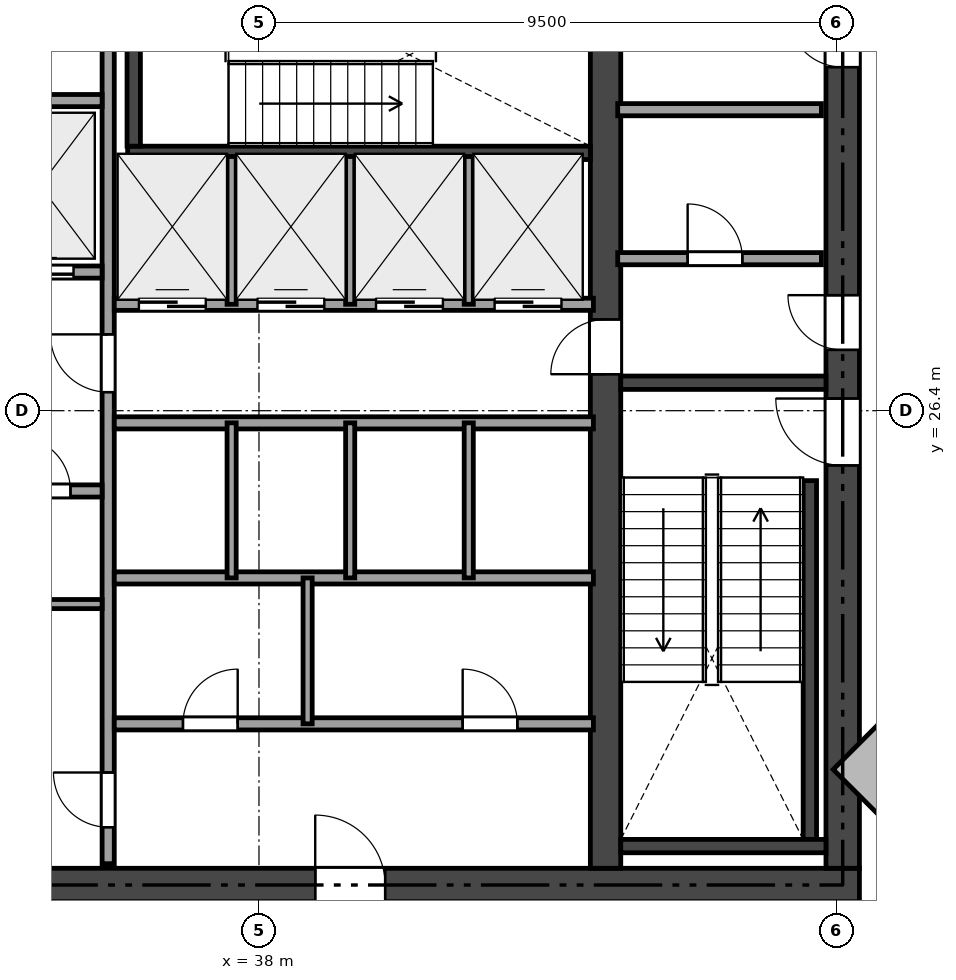
"""IFC4 building model, lengths in metres.
Left out: names, types, materials, properties, quantities, classifications, styles, units other than length and angle.
Written with IfcOpenShell. Run it as: python <this file> out.ifc"""

import sys

from ifc_helpers import new_model, si_unit, direction, frame, frame_2d, origin, place, context, subcontext, project, spatial, rectangle, extrude, element, fill, save


model = new_model("IFC4")
c1 = context("Model", 3, precision=1e-05, world=origin(), true_north=direction((0.0, 1.0)))
c2 = subcontext(c1, "Body", "Model", "MODEL_VIEW")
j1 = project(units=[si_unit("LENGTHUNIT", "METRE"), si_unit("PLANEANGLEUNIT", "RADIAN")], contexts=[c1])
p1 = place(None, origin())
s1 = spatial("IfcSite", under=j1, at=p1, CompositionType="ELEMENT")
p2 = place(p1, origin())
s2 = spatial("IfcBuilding", under=s1, at=p2, CompositionType="ELEMENT")
p3 = place(p2, frame((0.0, 0.0, 223.8)))
s3 = spatial("IfcBuildingStorey", under=s2, at=p3, CompositionType="ELEMENT", Elevation=223.8)
p4 = place(p3, frame((26.525, 18.6, 0.0), z_axis=(0.0, 0.0, 1.0), x_axis=(1.0, 0.0, 0.0)))
e1 = element("IfcWall", 1, at=p4, inside=s3, PredefinedType="SHEAR", context=c2, shape_type="SweptSolid", body=[
    extrude(rectangle(XDim=21.35, YDim=0.55, at=frame_2d((10.675, 0.0))), origin(), (0.0, 0.0, 1.0), 4.14),
])
p5 = place(p4, frame((12.4, 0.0, 0.0)))
e2 = element("IfcOpeningElement", 2, at=p5, cuts=e1, PredefinedType="OPENING", context=c2, shape_type="SweptSolid", body=[
    extrude(rectangle(XDim=1.15, YDim=2.15, at=frame_2d((0.575, 1.075))), frame((0.0, 0.285, 0.0), z_axis=(0.0, -1.0, 0.0), x_axis=(1.0, 0.0, 0.0)), (0.0, 0.0, 1.0), 0.57),
])
p6 = place(p4, frame((5.225, 0.0, 0.0)))
e3 = element("IfcOpeningElement", 3, at=p6, cuts=e1, PredefinedType="OPENING", context=c2, shape_type="SweptSolid", body=[
    extrude(rectangle(XDim=0.9, YDim=2.1, at=frame_2d((0.45, 1.05))), frame((0.0, 0.285, 0.0), z_axis=(0.0, -1.0, 0.0), x_axis=(1.0, 0.0, 0.0)), (0.0, 0.0, 1.0), 0.57),
])
p7 = place(p3, frame((47.6, 18.875, 0.0), z_axis=(0.0, 0.0, 1.0), x_axis=(0.0, 1.0, 0.0)))
e4 = element("IfcWall", 4, at=p7, inside=s3, PredefinedType="SHEAR", context=c2, shape_type="SweptSolid", body=[
    extrude(rectangle(XDim=15.05, YDim=0.55, at=frame_2d((7.525, 0.0))), origin(), (0.0, 0.0, 1.0), 4.14),
])
p8 = place(p7, frame((6.625, 0.0, 0.0)))
e5 = element("IfcOpeningElement", 5, at=p8, cuts=e4, PredefinedType="OPENING", context=c2, shape_type="SweptSolid", body=[
    extrude(rectangle(XDim=1.1, YDim=2.15, at=frame_2d((0.55, 1.075))), frame((0.0, 0.285, 0.0), z_axis=(0.0, -1.0, 0.0), x_axis=(1.0, 0.0, 0.0)), (0.0, 0.0, 1.0), 0.57),
])
p9 = place(p7, frame((8.525, 0.0, 0.0)))
e6 = element("IfcOpeningElement", 6, at=p9, cuts=e4, PredefinedType="OPENING", context=c2, shape_type="SweptSolid", body=[
    extrude(rectangle(XDim=0.9, YDim=2.1, at=frame_2d((0.45, 1.05))), frame((0.0, 0.285, 0.0), z_axis=(0.0, -1.0, 0.0), x_axis=(1.0, 0.0, 0.0)), (0.0, 0.0, 1.0), 0.57),
])
p10 = place(p7, frame((13.175, 0.0, 0.0)))
e7 = element("IfcOpeningElement", 7, at=p10, cuts=e4, PredefinedType="OPENING", context=c2, shape_type="SweptSolid", body=[
    extrude(rectangle(XDim=0.9, YDim=2.1, at=frame_2d((0.45, 1.05))), frame((0.0, 0.285, 0.0), z_axis=(0.0, -1.0, 0.0), x_axis=(1.0, 0.0, 0.0)), (0.0, 0.0, 1.0), 0.57),
])
p11 = place(p3, frame((43.7, 18.875, 0.0), z_axis=(0.0, 0.0, 1.0), x_axis=(0.0, 1.0, 0.0)))
e8 = element("IfcWall", 8, at=p11, inside=s3, PredefinedType="SHEAR", context=c2, shape_type="SweptSolid", body=[
    extrude(rectangle(XDim=15.05, YDim=0.5, at=frame_2d((7.525, 0.0))), origin(), (0.0, 0.0, 1.0), 4.14),
])
p12 = place(p11, frame((8.125, 0.0, 0.0)))
e9 = element("IfcOpeningElement", 9, at=p12, cuts=e8, PredefinedType="OPENING", context=c2, shape_type="SweptSolid", body=[
    extrude(rectangle(XDim=0.9, YDim=2.1, at=frame_2d((0.45, 1.05))), frame((0.0, 0.26, 0.0), z_axis=(0.0, -1.0, 0.0), x_axis=(1.0, 0.0, 0.0)), (0.0, 0.0, 1.0), 0.52),
])
p13 = place(p3, frame((43.95, 26.86, 0.0), z_axis=(0.0, 0.0, 1.0), x_axis=(1.0, 0.0, 0.0)))
e10 = element("IfcWall", 10, at=p13, inside=s3, PredefinedType="SHEAR", context=c2, shape_type="SweptSolid", body=[
    extrude(rectangle(XDim=3.375, YDim=0.22, at=frame_2d((1.688, 0.0))), origin(), (0.0, 0.0, 1.0), 4.14),
])
p14 = place(p3, frame((47.06, 19.35, 0.0), z_axis=(0.0, 0.0, 1.0), x_axis=(0.0, 1.0, 0.0)))
e11 = element("IfcWall", 11, at=p14, inside=s3, PredefinedType="SHEAR", context=c2, shape_type="SweptSolid", body=[
    extrude(rectangle(XDim=5.9, YDim=0.22, at=frame_2d((2.95, 0.0))), origin(), (0.0, 0.0, 1.0), 4.14),
])
p15 = place(p3, frame((43.95, 19.24, 0.0), z_axis=(0.0, 0.0, 1.0), x_axis=(1.0, 0.0, 0.0)))
e12 = element("IfcWall", 12, at=p15, inside=s3, PredefinedType="SHEAR", context=c2, shape_type="SweptSolid", body=[
    extrude(rectangle(XDim=3.375, YDim=0.22, at=frame_2d((1.688, 0.0))), origin(), (0.0, 0.0, 1.0), 4.14),
])
p16 = place(p3, frame((35.84, 30.64, 0.0), z_axis=(0.0, 0.0, 1.0), x_axis=(1.0, 0.0, 0.0)))
e13 = element("IfcWall", 13, at=p16, inside=s3, PredefinedType="SHEAR", context=c2, shape_type="SweptSolid", body=[
    extrude(rectangle(XDim=7.61, YDim=0.22, at=frame_2d((3.805, 0.0))), origin(), (0.0, 0.0, 1.0), 4.14),
])
p17 = place(p3, frame((35.94, 30.75, 0.0), z_axis=(0.0, 0.0, 1.0), x_axis=(0.0, 1.0, 0.0)))
e14 = element("IfcWall", 14, at=p17, inside=s3, PredefinedType="SHEAR", context=c2, shape_type="SweptSolid", body=[
    extrude(rectangle(XDim=3.175, YDim=0.22, at=frame_2d((1.587, 0.0))), origin(), (0.0, 0.0, 1.0), 4.14),
])
p18 = place(p3, frame((43.9, 28.9, 0.0), z_axis=(0.0, 0.0, 1.0), x_axis=(1.0, 0.0, 0.0)))
e15 = element("IfcWall", 15, at=p18, inside=s3, PredefinedType="SOLIDWALL", context=c2, shape_type="SweptSolid", body=[
    extrude(rectangle(XDim=3.35, YDim=0.2, at=frame_2d((1.675, 0.0))), origin(), (0.0, 0.0, 1.0), 4.14),
])
p19 = place(p18, frame((1.15, 0.0, 0.0)))
e16 = element("IfcOpeningElement", 16, at=p19, cuts=e15, PredefinedType="OPENING", context=c2, shape_type="SweptSolid", body=[
    extrude(rectangle(XDim=0.9, YDim=2.1, at=frame_2d((0.45, 1.05))), frame((0.0, 0.11, 0.0), z_axis=(0.0, -1.0, 0.0), x_axis=(1.0, 0.0, 0.0)), (0.0, 0.0, 1.0), 0.22),
])
p20 = place(p3, frame((43.9, 31.35, 0.0), z_axis=(0.0, 0.0, 1.0), x_axis=(1.0, 0.0, 0.0)))
e17 = element("IfcWall", 17, at=p20, inside=s3, PredefinedType="SOLIDWALL", context=c2, shape_type="SweptSolid", body=[
    extrude(rectangle(XDim=3.35, YDim=0.2, at=frame_2d((1.675, 0.0))), origin(), (0.0, 0.0, 1.0), 4.14),
])
p21 = place(p3, frame((35.52, 18.95, 0.0), z_axis=(0.0, 0.0, 1.0), x_axis=(0.0, 1.0, 0.0)))
e18 = element("IfcWall", 18, at=p21, inside=s3, PredefinedType="SOLIDWALL", context=c2, shape_type="SweptSolid", body=[
    extrude(rectangle(XDim=14.9, YDim=0.2, at=frame_2d((7.45, 0.0))), origin(), (0.0, 0.0, 1.0), 3.661),
])
p22 = place(p21, frame((7.755, 0.0, 0.0)))
e19 = element("IfcOpeningElement", 19, at=p22, cuts=e18, PredefinedType="OPENING", context=c2, shape_type="SweptSolid", body=[
    extrude(rectangle(XDim=0.95, YDim=2.15, at=frame_2d((0.475, 1.075))), frame((0.0, 0.11, 0.0), z_axis=(0.0, -1.0, 0.0), x_axis=(1.0, 0.0, 0.0)), (0.0, 0.0, 1.0), 0.22),
])
p23 = place(p21, frame((0.6, 0.0, 0.0)))
e20 = element("IfcOpeningElement", 20, at=p23, cuts=e18, PredefinedType="OPENING", context=c2, shape_type="SweptSolid", body=[
    extrude(rectangle(XDim=0.9, YDim=2.1, at=frame_2d((0.45, 1.05))), frame((0.0, 0.11, 0.0), z_axis=(0.0, -1.0, 0.0), x_axis=(1.0, 0.0, 0.0)), (0.0, 0.0, 1.0), 0.22),
])
p24 = place(p3, frame((31.0, 28.68, 0.0), z_axis=(0.0, 0.0, 1.0), x_axis=(1.0, 0.0, 0.0)))
e21 = element("IfcWall", 21, at=p24, inside=s3, PredefinedType="SOLIDWALL", context=c2, shape_type="SweptSolid", body=[
    extrude(rectangle(XDim=4.42, YDim=0.2, at=frame_2d((2.21, 0.0))), origin(), (0.0, 0.0, 1.0), 4.14),
])
p25 = place(p24, frame((0.6, 0.0, 0.0)))
e22 = element("IfcOpeningElement", 22, at=p25, cuts=e21, PredefinedType="OPENING", context=c2, shape_type="SweptSolid", body=[
    extrude(rectangle(XDim=1.1, YDim=2.15, at=frame_2d((0.55, 1.075))), frame((0.0, 0.11, 0.0), z_axis=(0.0, -1.0, 0.0), x_axis=(1.0, 0.0, 0.0)), (0.0, 0.0, 1.0), 0.22),
])
p26 = place(p24, frame((2.85, 0.0, 0.0)))
e23 = element("IfcOpeningElement", 23, at=p26, cuts=e21, PredefinedType="OPENING", context=c2, shape_type="SweptSolid", body=[
    extrude(rectangle(XDim=1.1, YDim=2.15, at=frame_2d((0.55, 1.075))), frame((0.0, 0.11, 0.0), z_axis=(0.0, -1.0, 0.0), x_axis=(1.0, 0.0, 0.0)), (0.0, 0.0, 1.0), 0.22),
])
p27 = place(p3, frame((31.0, 31.5, 0.0), z_axis=(0.0, 0.0, 1.0), x_axis=(1.0, 0.0, 0.0)))
e24 = element("IfcWall", 24, at=p27, inside=s3, PredefinedType="SOLIDWALL", context=c2, shape_type="SweptSolid", body=[
    extrude(rectangle(XDim=4.42, YDim=0.2, at=frame_2d((2.21, 0.0))), origin(), (0.0, 0.0, 1.0), 4.14),
])
p28 = place(p3, frame((31.0, 25.08, 0.0), z_axis=(0.0, 0.0, 1.0), x_axis=(1.0, 0.0, 0.0)))
e25 = element("IfcWall", 25, at=p28, inside=s3, PredefinedType="SOLIDWALL", context=c2, shape_type="SweptSolid", body=[
    extrude(rectangle(XDim=4.42, YDim=0.2, at=frame_2d((2.21, 0.0))), origin(), (0.0, 0.0, 1.0), 4.14),
])
p29 = place(p28, frame((3.0, 0.0, 0.0)))
e26 = element("IfcOpeningElement", 26, at=p29, cuts=e25, PredefinedType="OPENING", context=c2, shape_type="SweptSolid", body=[
    extrude(rectangle(XDim=0.9, YDim=2.1, at=frame_2d((0.45, 1.05))), frame((0.0, 0.11, 0.0), z_axis=(0.0, -1.0, 0.0), x_axis=(1.0, 0.0, 0.0)), (0.0, 0.0, 1.0), 0.22),
])
p30 = place(p28, frame((0.62, 0.0, 0.0)))
e27 = element("IfcOpeningElement", 27, at=p30, cuts=e25, PredefinedType="OPENING", context=c2, shape_type="SweptSolid", body=[
    extrude(rectangle(XDim=1.2, YDim=2.15, at=frame_2d((0.6, 1.075))), frame((0.0, 0.11, 0.0), z_axis=(0.0, -1.0, 0.0), x_axis=(1.0, 0.0, 0.0)), (0.0, 0.0, 1.0), 0.22),
])
p31 = place(p3, frame((33.42, 23.22, 0.0), z_axis=(0.0, 0.0, 1.0), x_axis=(1.0, 0.0, 0.0)))
e28 = element("IfcWall", 28, at=p31, inside=s3, PredefinedType="PARTITIONING", context=c2, shape_type="SweptSolid", body=[
    extrude(rectangle(XDim=2.0, YDim=0.15, at=frame_2d((1.0, 0.0))), origin(), (0.0, 0.0, 1.0), 4.14),
])
p32 = place(p3, frame((35.62, 28.15, 0.0), z_axis=(0.0, 0.0, 1.0), x_axis=(1.0, 0.0, 0.0)))
e29 = element("IfcWall", 29, at=p32, inside=s3, PredefinedType="SOLIDWALL", context=c2, shape_type="SweptSolid", body=[
    extrude(rectangle(XDim=7.88, YDim=0.2, at=frame_2d((3.94, 0.0))), origin(), (0.0, 0.0, 1.0), 4.14),
])
p33 = place(p32, frame((0.405, 0.0, 0.0)))
e30 = element("IfcOpeningElement", 30, at=p33, cuts=e29, PredefinedType="OPENING", context=c2, shape_type="SweptSolid", body=[
    extrude(rectangle(XDim=1.1, YDim=2.15, at=frame_2d((0.55, 1.075))), frame((0.0, 0.11, 0.0), z_axis=(0.0, -1.0, 0.0), x_axis=(1.0, 0.0, 0.0)), (0.0, 0.0, 1.0), 0.22),
])
p34 = place(p32, frame((2.355, 0.0, 0.0)))
e31 = element("IfcOpeningElement", 31, at=p34, cuts=e29, PredefinedType="OPENING", context=c2, shape_type="SweptSolid", body=[
    extrude(rectangle(XDim=1.1, YDim=2.15, at=frame_2d((0.55, 1.075))), frame((0.0, 0.11, 0.0), z_axis=(0.0, -1.0, 0.0), x_axis=(1.0, 0.0, 0.0)), (0.0, 0.0, 1.0), 0.22),
])
p35 = place(p32, frame((4.305, 0.0, 0.0)))
e32 = element("IfcOpeningElement", 32, at=p35, cuts=e29, PredefinedType="OPENING", context=c2, shape_type="SweptSolid", body=[
    extrude(rectangle(XDim=1.1, YDim=2.15, at=frame_2d((0.55, 1.075))), frame((0.0, 0.11, 0.0), z_axis=(0.0, -1.0, 0.0), x_axis=(1.0, 0.0, 0.0)), (0.0, 0.0, 1.0), 0.22),
])
p36 = place(p32, frame((6.255, 0.0, 0.0)))
e33 = element("IfcOpeningElement", 33, at=p36, cuts=e29, PredefinedType="OPENING", context=c2, shape_type="SweptSolid", body=[
    extrude(rectangle(XDim=1.1, YDim=2.15, at=frame_2d((0.55, 1.075))), frame((0.0, 0.11, 0.0), z_axis=(0.0, -1.0, 0.0), x_axis=(1.0, 0.0, 0.0)), (0.0, 0.0, 1.0), 0.22),
])
p37 = place(p3, frame((35.62, 26.2, 0.0), z_axis=(0.0, 0.0, 1.0), x_axis=(1.0, 0.0, 0.0)))
e34 = element("IfcWall", 34, at=p37, inside=s3, PredefinedType="SOLIDWALL", context=c2, shape_type="SweptSolid", body=[
    extrude(rectangle(XDim=7.88, YDim=0.2, at=frame_2d((3.94, 0.0))), origin(), (0.0, 0.0, 1.0), 4.14),
])
p38 = place(p3, frame((35.62, 23.65, 0.0), z_axis=(0.0, 0.0, 1.0), x_axis=(1.0, 0.0, 0.0)))
e35 = element("IfcWall", 35, at=p38, inside=s3, PredefinedType="SOLIDWALL", context=c2, shape_type="SweptSolid", body=[
    extrude(rectangle(XDim=7.88, YDim=0.2, at=frame_2d((3.94, 0.0))), origin(), (0.0, 0.0, 1.0), 3.661),
])
p39 = place(p3, frame((35.62, 21.25, 0.0), z_axis=(0.0, 0.0, 1.0), x_axis=(1.0, 0.0, 0.0)))
e36 = element("IfcWall", 36, at=p39, inside=s3, PredefinedType="SOLIDWALL", context=c2, shape_type="SweptSolid", body=[
    extrude(rectangle(XDim=7.88, YDim=0.2, at=frame_2d((3.94, 0.0))), origin(), (0.0, 0.0, 1.0), 4.14),
])
p40 = place(p39, frame((1.13, 0.0, 0.0)))
e37 = element("IfcOpeningElement", 37, at=p40, cuts=e36, PredefinedType="OPENING", context=c2, shape_type="SweptSolid", body=[
    extrude(rectangle(XDim=0.9, YDim=2.1, at=frame_2d((0.45, 1.05))), frame((0.0, 0.11, 0.0), z_axis=(0.0, -1.0, 0.0), x_axis=(1.0, 0.0, 0.0)), (0.0, 0.0, 1.0), 0.22),
])
p41 = place(p39, frame((5.73, 0.0, 0.0)))
e38 = element("IfcOpeningElement", 38, at=p41, cuts=e36, PredefinedType="OPENING", context=c2, shape_type="SweptSolid", body=[
    extrude(rectangle(XDim=0.9, YDim=2.1, at=frame_2d((0.45, 1.05))), frame((0.0, 0.11, 0.0), z_axis=(0.0, -1.0, 0.0), x_axis=(1.0, 0.0, 0.0)), (0.0, 0.0, 1.0), 0.22),
])
for number, where, z_axis, x_axis in (
    (39, (37.55, 28.15, 0.0), (0.0, 0.0, 1.0), (0.0, 1.0, 0.0)),
    (40, (39.5, 28.15, 0.0), (0.0, 0.0, 1.0), (0.0, 1.0, 0.0)),
    (41, (41.45, 28.15, 0.0), (0.0, 0.0, 1.0), (0.0, 1.0, 0.0)),
):
    element("IfcWall", number, at=place(p3, frame(where, z_axis=z_axis, x_axis=x_axis)), inside=s3, PredefinedType="PARTITIONING", context=c2, shape_type="SweptSolid", body=[
        extrude(rectangle(XDim=2.43, YDim=0.15, at=frame_2d((1.215, 0.0))), origin(), (0.0, 0.0, 1.0), 4.14),
    ])
for number, where, z_axis, x_axis in (
    (42, (37.55, 23.65, 0.0), (0.0, 0.0, 1.0), (0.0, 1.0, 0.0)),
    (43, (39.5, 23.65, 0.0), (0.0, 0.0, 1.0), (0.0, 1.0, 0.0)),
    (44, (41.45, 23.65, 0.0), (0.0, 0.0, 1.0), (0.0, 1.0, 0.0)),
):
    element("IfcWall", number, at=place(p3, frame(where, z_axis=z_axis, x_axis=x_axis)), inside=s3, PredefinedType="PARTITIONING", context=c2, shape_type="SweptSolid", body=[
        extrude(rectangle(XDim=2.55, YDim=0.15, at=frame_2d((1.275, 0.0))), origin(), (0.0, 0.0, 1.0), 3.661),
    ])
p42 = place(p3, frame((38.8, 21.25, 0.0), z_axis=(0.0, 0.0, 1.0), x_axis=(0.0, 1.0, 0.0)))
e45 = element("IfcWall", 45, at=p42, inside=s3, PredefinedType="PARTITIONING", context=c2, shape_type="SweptSolid", body=[
    extrude(rectangle(XDim=2.4, YDim=0.15, at=frame_2d((1.2, 0.0))), origin(), (0.0, 0.0, 1.0), 3.661),
])
p43 = place(p8, origin())
e46 = element("IfcDoor", 46, at=p43, inside=s3, OperationType="SINGLE_SWING_RIGHT", PredefinedType="DOOR", context=c2, shape_type="SweptSolid", body=[
    extrude(rectangle(XDim=1.1, YDim=2.15, at=frame_2d((0.55, 1.075))), frame((0.0, 0.025, 0.0), z_axis=(0.0, -1.0, 0.0), x_axis=(1.0, 0.0, 0.0)), (0.0, 0.0, 1.0), 0.05),
])
fill(e5, e46)
p44 = place(p22, origin())
e47 = element("IfcDoor", 47, at=p44, inside=s3, OperationType="SINGLE_SWING_RIGHT", PredefinedType="DOOR", context=c2, shape_type="SweptSolid", body=[
    extrude(rectangle(XDim=0.95, YDim=2.15, at=frame_2d((0.475, 1.075))), frame((0.0, 0.025, 0.0), z_axis=(0.0, -1.0, 0.0), x_axis=(1.0, 0.0, 0.0)), (0.0, 0.0, 1.0), 0.05),
])
fill(e19, e47)
p45 = place(p12, origin())
e48 = element("IfcDoor", 48, at=p45, inside=s3, OperationType="SINGLE_SWING_LEFT", PredefinedType="DOOR", context=c2, shape_type="SweptSolid", body=[
    extrude(rectangle(XDim=0.9, YDim=2.1, at=frame_2d((0.45, 1.05))), frame((0.0, 0.025, 0.0), z_axis=(0.0, -1.0, 0.0), x_axis=(1.0, 0.0, 0.0)), (0.0, 0.0, 1.0), 0.05),
])
fill(e9, e48)
p46 = place(p9, origin())
e49 = element("IfcDoor", 49, at=p46, inside=s3, OperationType="SINGLE_SWING_RIGHT", PredefinedType="DOOR", context=c2, shape_type="SweptSolid", body=[
    extrude(rectangle(XDim=0.9, YDim=2.1, at=frame_2d((0.45, 1.05))), frame((0.0, 0.025, 0.0), z_axis=(0.0, -1.0, 0.0), x_axis=(1.0, 0.0, 0.0)), (0.0, 0.0, 1.0), 0.05),
])
fill(e6, e49)
p47 = place(p5, origin())
e50 = element("IfcDoor", 50, at=p47, inside=s3, OperationType="SINGLE_SWING_LEFT", PredefinedType="DOOR", context=c2, shape_type="SweptSolid", body=[
    extrude(rectangle(XDim=1.15, YDim=2.15, at=frame_2d((0.575, 1.075))), frame((0.0, 0.025, 0.0), z_axis=(0.0, -1.0, 0.0), x_axis=(1.0, 0.0, 0.0)), (0.0, 0.0, 1.0), 0.05),
])
fill(e2, e50)
p48 = place(p19, origin())
e51 = element("IfcDoor", 51, at=p48, inside=s3, OperationType="SINGLE_SWING_LEFT", PredefinedType="DOOR", context=c2, shape_type="SweptSolid", body=[
    extrude(rectangle(XDim=0.9, YDim=2.1, at=frame_2d((0.45, 1.05))), frame((0.0, 0.025, 0.0), z_axis=(0.0, -1.0, 0.0), x_axis=(1.0, 0.0, 0.0)), (0.0, 0.0, 1.0), 0.05),
])
fill(e16, e51)
p49 = place(p10, origin())
e52 = element("IfcDoor", 52, at=p49, inside=s3, OperationType="SINGLE_SWING_RIGHT", PredefinedType="DOOR", context=c2, shape_type="SweptSolid", body=[
    extrude(rectangle(XDim=0.9, YDim=2.1, at=frame_2d((0.45, 1.05))), frame((0.0, 0.025, 0.0), z_axis=(0.0, -1.0, 0.0), x_axis=(1.0, 0.0, 0.0)), (0.0, 0.0, 1.0), 0.05),
])
fill(e7, e52)
p50 = place(p23, origin())
e53 = element("IfcDoor", 53, at=p50, inside=s3, OperationType="SINGLE_SWING_RIGHT", PredefinedType="DOOR", context=c2, shape_type="SweptSolid", body=[
    extrude(rectangle(XDim=0.9, YDim=2.1, at=frame_2d((0.45, 1.05))), frame((0.0, 0.025, 0.0), z_axis=(0.0, -1.0, 0.0), x_axis=(1.0, 0.0, 0.0)), (0.0, 0.0, 1.0), 0.05),
])
fill(e20, e53)
p51 = place(p29, origin())
e54 = element("IfcDoor", 54, at=p51, inside=s3, OperationType="SINGLE_SWING_LEFT", PredefinedType="DOOR", context=c2, shape_type="SweptSolid", body=[
    extrude(rectangle(XDim=0.9, YDim=2.1, at=frame_2d((0.45, 1.05))), frame((0.0, 0.025, 0.0), z_axis=(0.0, -1.0, 0.0), x_axis=(1.0, 0.0, 0.0)), (0.0, 0.0, 1.0), 0.05),
])
fill(e26, e54)
p52 = place(p40, origin())
e55 = element("IfcDoor", 55, at=p52, inside=s3, OperationType="SINGLE_SWING_RIGHT", PredefinedType="DOOR", context=c2, shape_type="SweptSolid", body=[
    extrude(rectangle(XDim=0.9, YDim=2.1, at=frame_2d((0.45, 1.05))), frame((0.0, 0.025, 0.0), z_axis=(0.0, -1.0, 0.0), x_axis=(1.0, 0.0, 0.0)), (0.0, 0.0, 1.0), 0.05),
])
fill(e37, e55)
p53 = place(p41, origin())
e56 = element("IfcDoor", 56, at=p53, inside=s3, OperationType="SINGLE_SWING_LEFT", PredefinedType="DOOR", context=c2, shape_type="SweptSolid", body=[
    extrude(rectangle(XDim=0.9, YDim=2.1, at=frame_2d((0.45, 1.05))), frame((0.0, 0.025, 0.0), z_axis=(0.0, -1.0, 0.0), x_axis=(1.0, 0.0, 0.0)), (0.0, 0.0, 1.0), 0.05),
])
fill(e38, e56)
p54 = place(p26, origin())
e57 = element("IfcDoor", 57, at=p54, inside=s3, OperationType="SLIDING_TO_LEFT", PredefinedType="DOOR", context=c2, shape_type="SweptSolid", body=[
    extrude(rectangle(XDim=1.1, YDim=2.15, at=frame_2d((0.55, 1.075))), frame((0.0, 0.025, 0.0), z_axis=(0.0, -1.0, 0.0), x_axis=(1.0, 0.0, 0.0)), (0.0, 0.0, 1.0), 0.05),
])
fill(e23, e57)
p55 = place(p33, origin())
e58 = element("IfcDoor", 58, at=p55, inside=s3, OperationType="SLIDING_TO_LEFT", PredefinedType="DOOR", context=c2, shape_type="SweptSolid", body=[
    extrude(rectangle(XDim=1.1, YDim=2.15, at=frame_2d((0.55, 1.075))), frame((0.0, 0.025, 0.0), z_axis=(0.0, -1.0, 0.0), x_axis=(1.0, 0.0, 0.0)), (0.0, 0.0, 1.0), 0.05),
])
fill(e30, e58)
p56 = place(p34, origin())
e59 = element("IfcDoor", 59, at=p56, inside=s3, OperationType="SLIDING_TO_LEFT", PredefinedType="DOOR", context=c2, shape_type="SweptSolid", body=[
    extrude(rectangle(XDim=1.1, YDim=2.15, at=frame_2d((0.55, 1.075))), frame((0.0, 0.025, 0.0), z_axis=(0.0, -1.0, 0.0), x_axis=(1.0, 0.0, 0.0)), (0.0, 0.0, 1.0), 0.05),
])
fill(e31, e59)
p57 = place(p35, origin())
e60 = element("IfcDoor", 60, at=p57, inside=s3, OperationType="SLIDING_TO_LEFT", PredefinedType="DOOR", context=c2, shape_type="SweptSolid", body=[
    extrude(rectangle(XDim=1.1, YDim=2.15, at=frame_2d((0.55, 1.075))), frame((0.0, 0.025, 0.0), z_axis=(0.0, -1.0, 0.0), x_axis=(1.0, 0.0, 0.0)), (0.0, 0.0, 1.0), 0.05),
])
fill(e32, e60)
p58 = place(p36, origin())
e61 = element("IfcDoor", 61, at=p58, inside=s3, OperationType="SLIDING_TO_LEFT", PredefinedType="DOOR", context=c2, shape_type="SweptSolid", body=[
    extrude(rectangle(XDim=1.1, YDim=2.15, at=frame_2d((0.55, 1.075))), frame((0.0, 0.025, 0.0), z_axis=(0.0, -1.0, 0.0), x_axis=(1.0, 0.0, 0.0)), (0.0, 0.0, 1.0), 0.05),
])
fill(e33, e61)
save(model, sys.argv[1])
